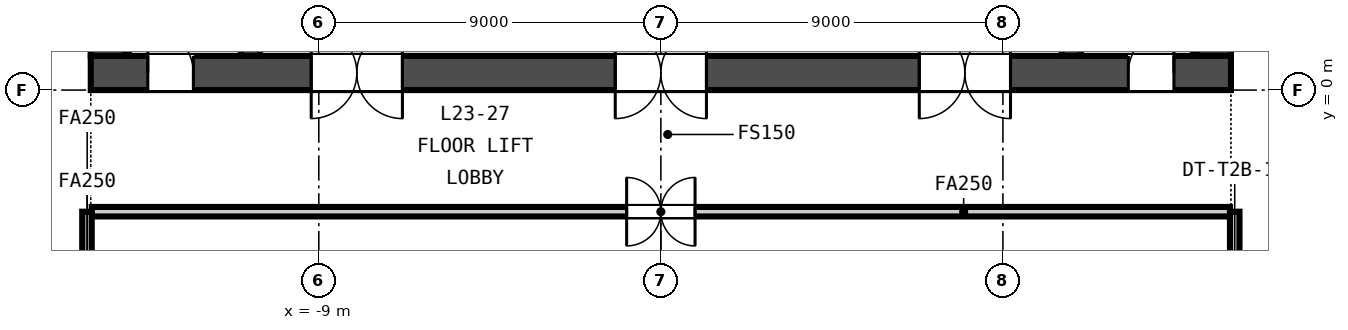
"""IFC4 building model, lengths in metres.
Left out: names, types, materials, properties, quantities, classifications, styles, units other than length and angle.
Written with IfcOpenShell. Run it as: python <this file> out.ifc"""

import sys

from ifc_helpers import new_model, si_unit, direction, frame, frame_2d, origin, place, context, subcontext, project, spatial, rectangle, extrude, element, fill, save


model = new_model("IFC4")
c1 = context("Model", 3, precision=1e-05, world=origin(), true_north=direction((0.0, 1.0)))
c2 = subcontext(c1, "Body", "Model", "MODEL_VIEW")
j1 = project(units=[si_unit("LENGTHUNIT", "METRE"), si_unit("PLANEANGLEUNIT", "RADIAN")], contexts=[c1])
p1 = place(None, origin())
s1 = spatial("IfcSite", under=j1, at=p1, CompositionType="ELEMENT")
p2 = place(p1, origin())
s2 = spatial("IfcBuilding", under=s1, at=p2, CompositionType="ELEMENT")
p3 = place(p2, frame((0.0, 0.0, 98.9)))
s3 = spatial("IfcBuildingStorey", under=s2, at=p3, CompositionType="ELEMENT", Elevation=98.9)
p4 = place(p3, frame((-15.0, 0.45, -0.15), z_axis=(0.0, 0.0, 1.0), x_axis=(1.0, 0.0, 0.0)))
e1 = element("IfcWall", 1, at=p4, inside=s3, PredefinedType="SOLIDWALL", context=c2, shape_type="SweptSolid", body=[
    extrude(rectangle(XDim=30.0, YDim=0.9, at=frame_2d((15.0, 0.0))), origin(), (0.0, 0.0, 1.0), 3.65),
])
p5 = place(p4, frame((5.8, 0.0, 0.15)))
e2 = element("IfcOpeningElement", 2, at=p5, cuts=e1, PredefinedType="OPENING", context=c2, shape_type="SweptSolid", body=[
    extrude(rectangle(XDim=2.4, YDim=2.4, at=frame_2d((1.2, 1.2))), frame((0.0, 0.46, 0.0), z_axis=(0.0, -1.0, 0.0), x_axis=(1.0, 0.0, 0.0)), (0.0, 0.0, 1.0), 0.92),
])
p6 = place(p4, frame((13.8, 0.0, 0.15)))
e3 = element("IfcOpeningElement", 3, at=p6, cuts=e1, PredefinedType="OPENING", context=c2, shape_type="SweptSolid", body=[
    extrude(rectangle(XDim=2.4, YDim=2.4, at=frame_2d((1.2, 1.2))), frame((0.0, 0.46, 0.0), z_axis=(0.0, -1.0, 0.0), x_axis=(1.0, 0.0, 0.0)), (0.0, 0.0, 1.0), 0.92),
])
p7 = place(p4, frame((21.8, 0.0, 0.15)))
e4 = element("IfcOpeningElement", 4, at=p7, cuts=e1, PredefinedType="OPENING", context=c2, shape_type="SweptSolid", body=[
    extrude(rectangle(XDim=2.4, YDim=2.4, at=frame_2d((1.2, 1.2))), frame((0.0, 0.46, 0.0), z_axis=(0.0, -1.0, 0.0), x_axis=(1.0, 0.0, 0.0)), (0.0, 0.0, 1.0), 0.92),
])
p8 = place(p4, frame((1.5, 0.0, 0.15)))
e5 = element("IfcOpeningElement", 5, at=p8, cuts=e1, PredefinedType="OPENING", context=c2, shape_type="SweptSolid", body=[
    extrude(rectangle(XDim=1.2, YDim=2.1, at=frame_2d((0.6, 1.05))), frame((0.0, 0.46, 0.0), z_axis=(0.0, -1.0, 0.0), x_axis=(1.0, 0.0, 0.0)), (0.0, 0.0, 1.0), 0.92),
])
p9 = place(p4, frame((27.3, 0.0, 0.15)))
e6 = element("IfcOpeningElement", 6, at=p9, cuts=e1, PredefinedType="OPENING", context=c2, shape_type="SweptSolid", body=[
    extrude(rectangle(XDim=1.2, YDim=2.1, at=frame_2d((0.6, 1.05))), frame((0.0, 0.46, 0.0), z_axis=(0.0, -1.0, 0.0), x_axis=(1.0, 0.0, 0.0)), (0.0, 0.0, 1.0), 0.92),
])
for number, where, z_axis, x_axis in (
    (7, (-14.55, 0.9, -0.15), (0.0, 0.0, 1.0), (0.0, 1.0, 0.0)),
    (8, (14.55, 0.9, -0.15), (0.0, 0.0, 1.0), (0.0, 1.0, 0.0)),
):
    element("IfcWall", number, at=place(p3, frame(where, z_axis=z_axis, x_axis=x_axis)), inside=s3, PredefinedType="SOLIDWALL", context=c2, shape_type="SweptSolid", body=[
        extrude(rectangle(XDim=13.2, YDim=0.9, at=frame_2d((6.6, 0.0))), origin(), (0.0, 0.0, 1.0), 3.65),
    ])
for number, where, z_axis, x_axis in (
    (9, (-10.8, 0.9, -0.15), (0.0, 0.0, 1.0), (0.0, 1.0, 0.0)),
    (10, (10.8, 0.9, -0.15), (0.0, 0.0, 1.0), (0.0, 1.0, 0.0)),
):
    element("IfcWall", number, at=place(p3, frame(where, z_axis=z_axis, x_axis=x_axis)), inside=s3, PredefinedType="SOLIDWALL", context=c2, shape_type="SweptSolid", body=[
        extrude(rectangle(XDim=13.2, YDim=0.5, at=frame_2d((6.6, 0.0))), origin(), (0.0, 0.0, 1.0), 3.65),
    ])
for number, where, z_axis, x_axis in (
    (11, (-14.05, 0.9, 0.0), (0.0, 0.0, 1.0), (0.0, 1.0, 0.0)),
    (12, (14.05, 0.9, 0.0), (0.0, 0.0, 1.0), (0.0, 1.0, 0.0)),
):
    element("IfcWall", number, at=place(p3, frame(where, z_axis=z_axis, x_axis=x_axis)), inside=s3, PredefinedType="SOLIDWALL", context=c2, shape_type="SweptSolid", body=[
        extrude(rectangle(XDim=13.2, YDim=0.1, at=frame_2d((6.6, 0.0))), origin(), (0.0, 0.0, 1.0), 3.5),
    ])
p10 = place(p3, frame((14.975, -3.2, 0.0), z_axis=(0.0, 0.0, 1.0), x_axis=(-1.0, 0.0, 0.0)))
e13 = element("IfcWall", 13, at=p10, inside=s3, PredefinedType="PARTITIONING", context=c2, shape_type="SweptSolid", body=[
    extrude(rectangle(XDim=29.95, YDim=0.25, at=frame_2d((14.975, 0.0))), origin(), (0.0, 0.0, 1.0), 2.741),
])
p11 = place(p10, frame((14.075, 0.0, 0.0)))
e14 = element("IfcOpeningElement", 14, at=p11, cuts=e13, PredefinedType="OPENING", context=c2, shape_type="SweptSolid", body=[
    extrude(rectangle(XDim=1.8, YDim=2.1, at=frame_2d((0.9, 1.05))), frame((0.0, 0.135, 0.0), z_axis=(0.0, -1.0, 0.0), x_axis=(1.0, 0.0, 0.0)), (0.0, 0.0, 1.0), 0.27),
])
p12 = place(p3, frame((-15.1, -3.2, 0.0), z_axis=(0.0, 0.0, 1.0), x_axis=(0.0, -1.0, 0.0)))
e15 = element("IfcWall", 15, at=p12, inside=s3, PredefinedType="PARTITIONING", context=c2, shape_type="SweptSolid", body=[
    extrude(rectangle(XDim=5.65, YDim=0.25, at=frame_2d((2.825, 0.0))), origin(), (0.0, 0.0, 1.0), 2.741),
])
p13 = place(p3, frame((15.1, -11.075, 0.0), z_axis=(0.0, 0.0, 1.0), x_axis=(0.0, 1.0, 0.0)))
e16 = element("IfcWall", 16, at=p13, inside=s3, PredefinedType="PARTITIONING", context=c2, shape_type="SweptSolid", body=[
    extrude(rectangle(XDim=7.875, YDim=0.25, at=frame_2d((3.938, 0.0))), origin(), (0.0, 0.0, 1.0), 2.741),
])
p14 = place(p13, frame((3.038, 0.0, 0.0)))
e17 = element("IfcOpeningElement", 17, at=p14, cuts=e16, PredefinedType="OPENING", context=c2, shape_type="SweptSolid", body=[
    extrude(rectangle(XDim=1.8, YDim=2.1, at=frame_2d((0.9, 1.05))), frame((0.0, 0.135, 0.0), z_axis=(0.0, -1.0, 0.0), x_axis=(1.0, 0.0, 0.0)), (0.0, 0.0, 1.0), 0.27),
])
p15 = place(p5, origin())
e18 = element("IfcDoor", 18, at=p15, inside=s3, OperationType="DOUBLE_DOOR_DOUBLE_SWING", PredefinedType="DOOR", context=c2, shape_type="SweptSolid", body=[
    extrude(rectangle(XDim=2.4, YDim=2.4, at=frame_2d((1.2, 1.2))), frame((0.0, 0.025, 0.0), z_axis=(0.0, -1.0, 0.0), x_axis=(1.0, 0.0, 0.0)), (0.0, 0.0, 1.0), 0.05),
])
fill(e2, e18)
p16 = place(p6, origin())
e19 = element("IfcDoor", 19, at=p16, inside=s3, OperationType="DOUBLE_DOOR_DOUBLE_SWING", PredefinedType="DOOR", context=c2, shape_type="SweptSolid", body=[
    extrude(rectangle(XDim=2.4, YDim=2.4, at=frame_2d((1.2, 1.2))), frame((0.0, 0.025, 0.0), z_axis=(0.0, -1.0, 0.0), x_axis=(1.0, 0.0, 0.0)), (0.0, 0.0, 1.0), 0.05),
])
fill(e3, e19)
p17 = place(p7, origin())
e20 = element("IfcDoor", 20, at=p17, inside=s3, OperationType="DOUBLE_DOOR_DOUBLE_SWING", PredefinedType="DOOR", context=c2, shape_type="SweptSolid", body=[
    extrude(rectangle(XDim=2.4, YDim=2.4, at=frame_2d((1.2, 1.2))), frame((0.0, 0.025, 0.0), z_axis=(0.0, -1.0, 0.0), x_axis=(1.0, 0.0, 0.0)), (0.0, 0.0, 1.0), 0.05),
])
fill(e4, e20)
p18 = place(p8, origin())
e21 = element("IfcDoor", 21, at=p18, inside=s3, OperationType="SINGLE_SWING_LEFT", PredefinedType="DOOR", context=c2, shape_type="SweptSolid", body=[
    extrude(rectangle(XDim=1.2, YDim=2.1, at=frame_2d((0.6, 1.05))), frame((0.0, 0.025, 0.0), z_axis=(0.0, -1.0, 0.0), x_axis=(1.0, 0.0, 0.0)), (0.0, 0.0, 1.0), 0.05),
])
fill(e5, e21)
p19 = place(p9, origin())
e22 = element("IfcDoor", 22, at=p19, inside=s3, OperationType="SINGLE_SWING_RIGHT", PredefinedType="DOOR", context=c2, shape_type="SweptSolid", body=[
    extrude(rectangle(XDim=1.2, YDim=2.1, at=frame_2d((0.6, 1.05))), frame((0.0, 0.025, 0.0), z_axis=(0.0, -1.0, 0.0), x_axis=(1.0, 0.0, 0.0)), (0.0, 0.0, 1.0), 0.05),
])
fill(e6, e22)
p20 = place(p11, origin())
e23 = element("IfcDoor", 23, at=p20, inside=s3, OperationType="DOUBLE_DOOR_DOUBLE_SWING", PredefinedType="DOOR", context=c2, shape_type="SweptSolid", body=[
    extrude(rectangle(XDim=1.8, YDim=2.1, at=frame_2d((0.9, 1.05))), frame((0.0, 0.025, 0.0), z_axis=(0.0, -1.0, 0.0), x_axis=(1.0, 0.0, 0.0)), (0.0, 0.0, 1.0), 0.05),
])
fill(e14, e23)
save(model, sys.argv[1])
